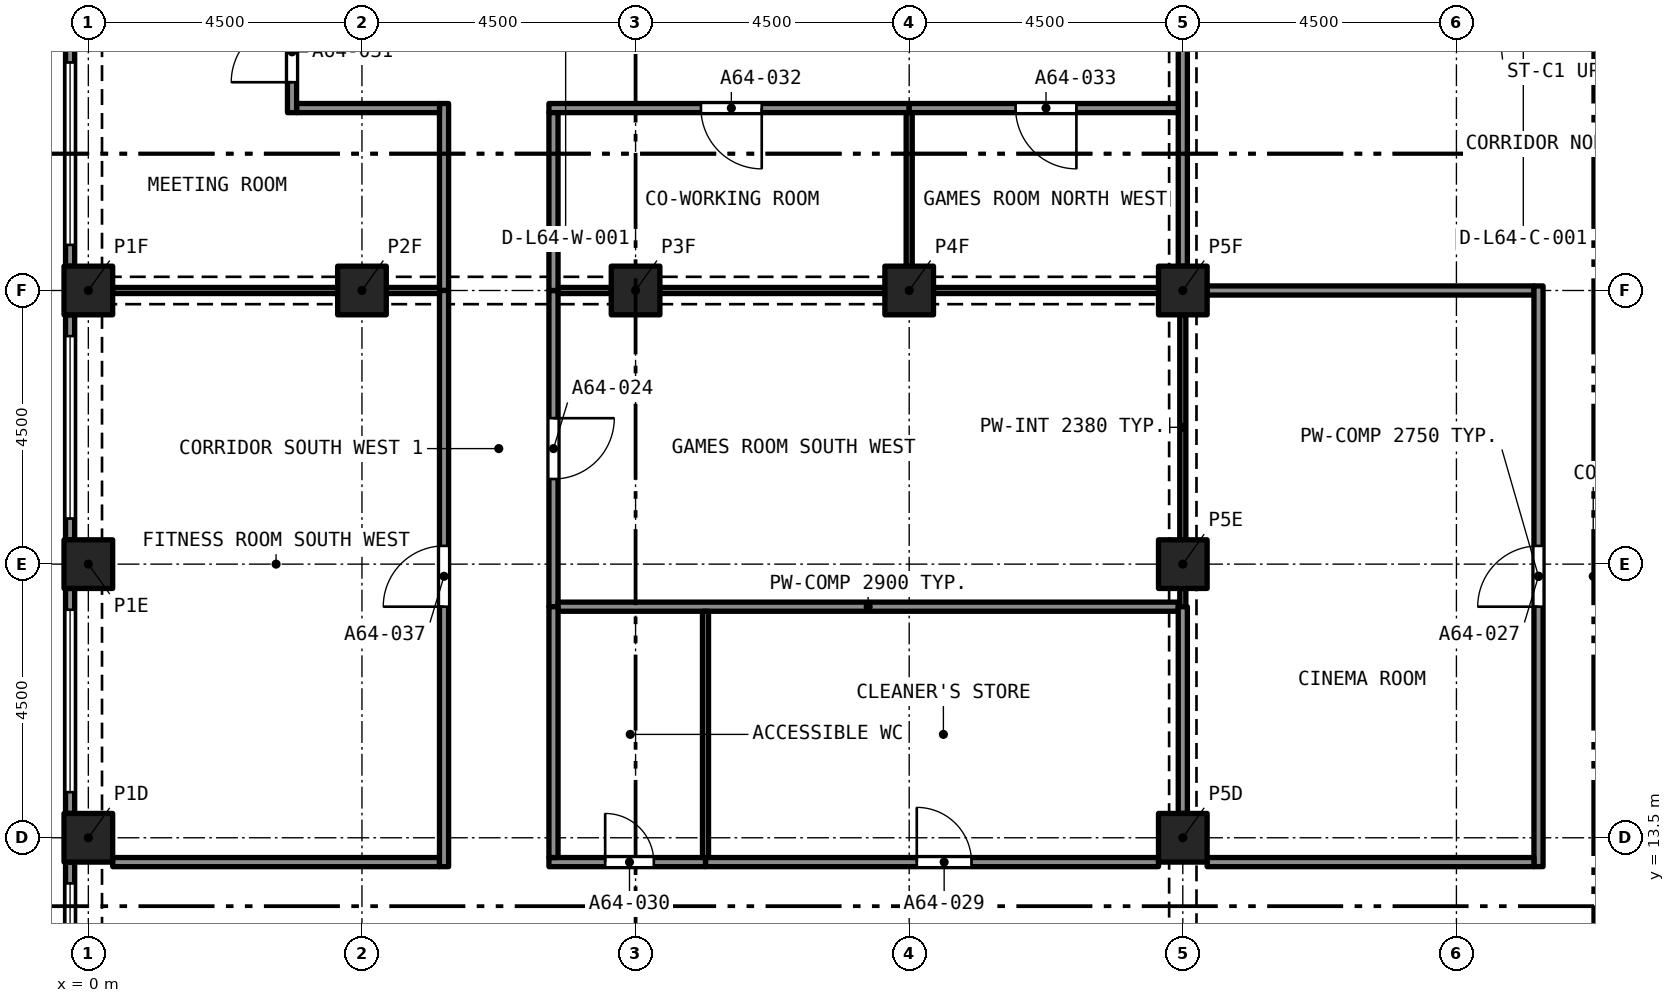
"""IFC4 building model, lengths in metres.
Left out: names, types, materials, properties, quantities, classifications, styles, units other than length and angle.
Written with IfcOpenShell. Run it as: python <this file> out.ifc"""

import sys

from ifc_helpers import new_model, si_unit, direction, frame, frame_2d, origin, origin_2d, place, context, subcontext, project, spatial, rectangle, extrude, element, fill, save


model = new_model("IFC4")
c1 = context("Model", 3, precision=1e-05, world=origin(), true_north=direction((0.0, 1.0)))
c2 = subcontext(c1, "Body", "Model", "MODEL_VIEW")
j1 = project(units=[si_unit("LENGTHUNIT", "METRE"), si_unit("PLANEANGLEUNIT", "RADIAN")], contexts=[c1])
p1 = place(None, origin())
s1 = spatial("IfcSite", under=j1, at=p1, CompositionType="ELEMENT")
p2 = place(p1, origin())
s2 = spatial("IfcBuilding", under=s1, at=p2, CompositionType="ELEMENT")
p3 = place(p2, frame((0.0, 0.0, 229.295)))
s3 = spatial("IfcBuildingStorey", under=s2, at=p3, CompositionType="ELEMENT", Elevation=229.295)
for number, where, z_axis, x_axis in (
    (1, (0.0, 13.5, 0.0), (0.0, 0.0, 1.0), (1.0, 0.0, 0.0)),
    (2, (18.0, 13.5, 0.0), (0.0, 0.0, 1.0), (1.0, 0.0, 0.0)),
    (3, (0.0, 18.0, 0.0), (0.0, 0.0, 1.0), (1.0, 0.0, 0.0)),
    (4, (18.0, 18.0, 0.0), (0.0, 0.0, 1.0), (1.0, 0.0, 0.0)),
    (5, (0.0, 22.5, 0.0), (0.0, 0.0, 1.0), (1.0, 0.0, 0.0)),
    (6, (4.5, 22.5, 0.0), (0.0, 0.0, 1.0), (1.0, 0.0, 0.0)),
    (7, (9.0, 22.5, 0.0), (0.0, 0.0, 1.0), (1.0, 0.0, 0.0)),
    (8, (13.5, 22.5, 0.0), (0.0, 0.0, 1.0), (1.0, 0.0, 0.0)),
    (9, (18.0, 22.5, 0.0), (0.0, 0.0, 1.0), (1.0, 0.0, 0.0)),
):
    element("IfcColumn", number, at=place(p3, frame(where, z_axis=z_axis, x_axis=x_axis)), inside=s3, PredefinedType="COLUMN", context=c2, shape_type="SweptSolid", body=[
        extrude(rectangle(XDim=0.8, YDim=0.8, at=origin_2d()), origin(), (0.0, 0.0, 1.0), 3.2),
    ])
p4 = place(p3, frame((-0.3, 22.9, 0.0), z_axis=(0.0, 0.0, 1.0), x_axis=(0.0, 1.0, 0.0)))
e10 = element("IfcWall", 10, at=p4, inside=s3, PredefinedType="SOLIDWALL", context=c2, shape_type="SweptSolid", body=[
    extrude(rectangle(XDim=3.7, YDim=0.15, at=frame_2d((1.85, 0.0))), origin(), (0.0, 0.0, 1.0), 3.2),
])
p5 = place(p4, frame((0.35, 0.0, 0.45)))
e11 = element("IfcOpeningElement", 11, at=p5, cuts=e10, PredefinedType="OPENING", context=c2, shape_type="SweptSolid", body=[
    extrude(rectangle(XDim=3.0, YDim=1.95, at=frame_2d((1.5, 0.975))), frame((0.0, 0.085, 0.0), z_axis=(0.0, -1.0, 0.0), x_axis=(1.0, 0.0, 0.0)), (0.0, 0.0, 1.0), 0.17),
])
p6 = place(p3, frame((-0.3, 18.4, 0.0), z_axis=(0.0, 0.0, 1.0), x_axis=(0.0, 1.0, 0.0)))
e12 = element("IfcWall", 12, at=p6, inside=s3, PredefinedType="SOLIDWALL", context=c2, shape_type="SweptSolid", body=[
    extrude(rectangle(XDim=3.7, YDim=0.15, at=frame_2d((1.85, 0.0))), origin(), (0.0, 0.0, 1.0), 3.2),
])
p7 = place(p6, frame((0.35, 0.0, 0.45)))
e13 = element("IfcOpeningElement", 13, at=p7, cuts=e12, PredefinedType="OPENING", context=c2, shape_type="SweptSolid", body=[
    extrude(rectangle(XDim=3.0, YDim=1.95, at=frame_2d((1.5, 0.975))), frame((0.0, 0.085, 0.0), z_axis=(0.0, -1.0, 0.0), x_axis=(1.0, 0.0, 0.0)), (0.0, 0.0, 1.0), 0.17),
])
p8 = place(p3, frame((-0.3, 13.9, 0.0), z_axis=(0.0, 0.0, 1.0), x_axis=(0.0, 1.0, 0.0)))
e14 = element("IfcWall", 14, at=p8, inside=s3, PredefinedType="SOLIDWALL", context=c2, shape_type="SweptSolid", body=[
    extrude(rectangle(XDim=3.7, YDim=0.15, at=frame_2d((1.85, 0.0))), origin(), (0.0, 0.0, 1.0), 3.2),
])
p9 = place(p8, frame((0.35, 0.0, 0.45)))
e15 = element("IfcOpeningElement", 15, at=p9, cuts=e14, PredefinedType="OPENING", context=c2, shape_type="SweptSolid", body=[
    extrude(rectangle(XDim=3.0, YDim=1.95, at=frame_2d((1.5, 0.975))), frame((0.0, 0.085, 0.0), z_axis=(0.0, -1.0, 0.0), x_axis=(1.0, 0.0, 0.0)), (0.0, 0.0, 1.0), 0.17),
])
p10 = place(p3, frame((-0.3, 9.4, 0.0), z_axis=(0.0, 0.0, 1.0), x_axis=(0.0, 1.0, 0.0)))
e16 = element("IfcWall", 16, at=p10, inside=s3, PredefinedType="SOLIDWALL", context=c2, shape_type="SweptSolid", body=[
    extrude(rectangle(XDim=3.7, YDim=0.15, at=frame_2d((1.85, 0.0))), origin(), (0.0, 0.0, 1.0), 3.2),
])
p11 = place(p10, frame((0.35, 0.0, 0.45)))
e17 = element("IfcOpeningElement", 17, at=p11, cuts=e16, PredefinedType="OPENING", context=c2, shape_type="SweptSolid", body=[
    extrude(rectangle(XDim=3.0, YDim=1.95, at=frame_2d((1.5, 0.975))), frame((0.0, 0.085, 0.0), z_axis=(0.0, -1.0, 0.0), x_axis=(1.0, 0.0, 0.0)), (0.0, 0.0, 1.0), 0.17),
])
p12 = place(p3, frame((18.0, 18.4, 0.0), z_axis=(0.0, 0.0, 1.0), x_axis=(0.0, 1.0, 0.0)))
e18 = element("IfcWall", 18, at=p12, inside=s3, PredefinedType="PARTITIONING", context=c2, shape_type="SweptSolid", body=[
    extrude(rectangle(XDim=3.7, YDim=0.1, at=frame_2d((1.85, 0.0))), origin(), (0.0, 0.0, 1.0), 2.38),
])
p13 = place(p3, frame((18.0, 17.3, 0.0), z_axis=(0.0, 0.0, 1.0), x_axis=(0.0, 1.0, 0.0)))
e19 = element("IfcWall", 19, at=p13, inside=s3, PredefinedType="PARTITIONING", context=c2, shape_type="SweptSolid", body=[
    extrude(rectangle(XDim=0.3, YDim=0.1, at=frame_2d((0.15, 0.0))), origin(), (0.0, 0.0, 1.0), 2.75),
])
p14 = place(p3, frame((7.65, 22.5, 0.0), z_axis=(0.0, 0.0, 1.0), x_axis=(0.0, -1.0, 0.0)))
e20 = element("IfcWall", 20, at=p14, inside=s3, PredefinedType="PARTITIONING", context=c2, shape_type="SweptSolid", body=[
    extrude(rectangle(XDim=5.2, YDim=0.15, at=frame_2d((2.6, 0.0))), origin(), (0.0, 0.0, 1.0), 2.9),
])
p15 = place(p14, frame((2.1, 0.0, 0.0)))
e21 = element("IfcOpeningElement", 21, at=p15, cuts=e20, PredefinedType="OPENING", context=c2, shape_type="SweptSolid", body=[
    extrude(rectangle(XDim=1.0, YDim=2.1, at=frame_2d((0.5, 1.05))), frame((0.0, 0.085, 0.0), z_axis=(0.0, -1.0, 0.0), x_axis=(1.0, 0.0, 0.0)), (0.0, 0.0, 1.0), 0.17),
])
p16 = place(p3, frame((7.725, 22.5, 0.0), z_axis=(0.0, 0.0, 1.0), x_axis=(1.0, 0.0, 0.0)))
e22 = element("IfcWall", 22, at=p16, inside=s3, PredefinedType="PARTITIONING", context=c2, shape_type="SweptSolid", body=[
    extrude(rectangle(XDim=0.875, YDim=0.1, at=frame_2d((0.438, 0.0))), origin(), (0.0, 0.0, 1.0), 2.38),
])
for number, where, z_axis, x_axis in (
    (23, (9.4, 22.5, 0.0), (0.0, 0.0, 1.0), (1.0, 0.0, 0.0)),
    (24, (13.9, 22.5, 0.0), (0.0, 0.0, 1.0), (1.0, 0.0, 0.0)),
):
    element("IfcWall", number, at=place(p3, frame(where, z_axis=z_axis, x_axis=x_axis)), inside=s3, PredefinedType="PARTITIONING", context=c2, shape_type="SweptSolid", body=[
        extrude(rectangle(XDim=3.7, YDim=0.1, at=frame_2d((1.85, 0.0))), origin(), (0.0, 0.0, 1.0), 2.38),
    ])
p17 = place(p3, frame((7.725, 17.3, 0.0), z_axis=(0.0, 0.0, 1.0), x_axis=(1.0, 0.0, 0.0)))
e25 = element("IfcWall", 25, at=p17, inside=s3, PredefinedType="PARTITIONING", context=c2, shape_type="SweptSolid", body=[
    extrude(rectangle(XDim=10.2, YDim=0.15, at=frame_2d((5.1, 0.0))), origin(), (0.0, 0.0, 1.0), 2.9),
])
p18 = place(p3, frame((18.4, 22.5, 0.0), z_axis=(0.0, 0.0, 1.0), x_axis=(1.0, 0.0, 0.0)))
e26 = element("IfcWall", 26, at=p18, inside=s3, PredefinedType="PARTITIONING", context=c2, shape_type="SweptSolid", body=[
    extrude(rectangle(XDim=5.375, YDim=0.15, at=frame_2d((2.688, 0.0))), origin(), (0.0, 0.0, 1.0), 2.75),
])
p19 = place(p3, frame((18.0, 22.9, 0.0), z_axis=(0.0, 0.0, 1.0), x_axis=(0.0, 1.0, 0.0)))
e27 = element("IfcWall", 27, at=p19, inside=s3, PredefinedType="PARTITIONING", context=c2, shape_type="SweptSolid", body=[
    extrude(rectangle(XDim=3.7, YDim=0.15, at=frame_2d((1.85, 0.0))), origin(), (0.0, 0.0, 1.0), 2.38),
])
p20 = place(p3, frame((23.85, 13.025, 0.0), z_axis=(0.0, 0.0, 1.0), x_axis=(0.0, 1.0, 0.0)))
e28 = element("IfcWall", 28, at=p20, inside=s3, PredefinedType="PARTITIONING", context=c2, shape_type="SweptSolid", body=[
    extrude(rectangle(XDim=9.55, YDim=0.15, at=frame_2d((4.775, 0.0))), origin(), (0.0, 0.0, 1.0), 2.75),
])
p21 = place(p20, frame((4.275, 0.0, 0.0)))
e29 = element("IfcOpeningElement", 29, at=p21, cuts=e28, PredefinedType="OPENING", context=c2, shape_type="SweptSolid", body=[
    extrude(rectangle(XDim=1.0, YDim=2.1, at=frame_2d((0.5, 1.05))), frame((0.0, 0.085, 0.0), z_axis=(0.0, -1.0, 0.0), x_axis=(1.0, 0.0, 0.0)), (0.0, 0.0, 1.0), 0.17),
])
p22 = place(p3, frame((18.4, 13.1, 0.0), z_axis=(0.0, 0.0, 1.0), x_axis=(1.0, 0.0, 0.0)))
e30 = element("IfcWall", 30, at=p22, inside=s3, PredefinedType="PARTITIONING", context=c2, shape_type="SweptSolid", body=[
    extrude(rectangle(XDim=5.375, YDim=0.15, at=frame_2d((2.688, 0.0))), origin(), (0.0, 0.0, 1.0), 2.75),
])
p23 = place(p3, frame((10.15, 13.1, 0.0), z_axis=(0.0, 0.0, 1.0), x_axis=(1.0, 0.0, 0.0)))
e31 = element("IfcWall", 31, at=p23, inside=s3, PredefinedType="PARTITIONING", context=c2, shape_type="SweptSolid", body=[
    extrude(rectangle(XDim=7.45, YDim=0.15, at=frame_2d((3.725, 0.0))), origin(), (0.0, 0.0, 1.0), 2.9),
])
p24 = place(p23, frame((3.475, 0.0, 0.0)))
e32 = element("IfcOpeningElement", 32, at=p24, cuts=e31, PredefinedType="OPENING", context=c2, shape_type="SweptSolid", body=[
    extrude(rectangle(XDim=0.9, YDim=2.1, at=frame_2d((0.45, 1.05))), frame((0.0, 0.085, 0.0), z_axis=(0.0, -1.0, 0.0), x_axis=(1.0, 0.0, 0.0)), (0.0, 0.0, 1.0), 0.17),
])
p25 = place(p3, frame((7.575, 13.1, 0.0), z_axis=(0.0, 0.0, 1.0), x_axis=(1.0, 0.0, 0.0)))
e33 = element("IfcWall", 33, at=p25, inside=s3, PredefinedType="PARTITIONING", context=c2, shape_type="SweptSolid", body=[
    extrude(rectangle(XDim=2.575, YDim=0.15, at=frame_2d((1.288, 0.0))), origin(), (0.0, 0.0, 1.0), 2.9),
])
p26 = place(p25, frame((0.925, 0.0, 0.0)))
e34 = element("IfcOpeningElement", 34, at=p26, cuts=e33, PredefinedType="OPENING", context=c2, shape_type="SweptSolid", body=[
    extrude(rectangle(XDim=0.8, YDim=2.1, at=frame_2d((0.4, 1.05))), frame((0.0, 0.085, 0.0), z_axis=(0.0, -1.0, 0.0), x_axis=(1.0, 0.0, 0.0)), (0.0, 0.0, 1.0), 0.17),
])
p27 = place(p3, frame((0.4, 13.1, 0.0), z_axis=(0.0, 0.0, 1.0), x_axis=(1.0, 0.0, 0.0)))
e35 = element("IfcWall", 35, at=p27, inside=s3, PredefinedType="PARTITIONING", context=c2, shape_type="SweptSolid", body=[
    extrude(rectangle(XDim=5.375, YDim=0.15, at=frame_2d((2.688, 0.0))), origin(), (0.0, 0.0, 1.0), 2.9),
])
p28 = place(p3, frame((18.0, 13.9, 0.0), z_axis=(0.0, 0.0, 1.0), x_axis=(0.0, 1.0, 0.0)))
e36 = element("IfcWall", 36, at=p28, inside=s3, PredefinedType="PARTITIONING", context=c2, shape_type="SweptSolid", body=[
    extrude(rectangle(XDim=3.4, YDim=0.15, at=frame_2d((1.7, 0.0))), origin(), (0.0, 0.0, 1.0), 2.38),
])
p29 = place(p3, frame((5.85, 22.5, 0.0), z_axis=(0.0, 0.0, 1.0), x_axis=(0.0, 1.0, 0.0)))
e37 = element("IfcWall", 37, at=p29, inside=s3, PredefinedType="PARTITIONING", context=c2, shape_type="SweptSolid", body=[
    extrude(rectangle(XDim=3.075, YDim=0.15, at=frame_2d((1.538, 0.0))), origin(), (0.0, 0.0, 1.0), 2.9),
])
p30 = place(p3, frame((3.425, 25.5, 0.0), z_axis=(0.0, 0.0, 1.0), x_axis=(1.0, 0.0, 0.0)))
e38 = element("IfcWall", 38, at=p30, inside=s3, PredefinedType="PARTITIONING", context=c2, shape_type="SweptSolid", body=[
    extrude(rectangle(XDim=2.35, YDim=0.15, at=frame_2d((1.175, 0.0))), origin(), (0.0, 0.0, 1.0), 2.9),
])
p31 = place(p3, frame((3.35, 25.425, 0.0), z_axis=(0.0, 0.0, 1.0), x_axis=(0.0, 1.0, 0.0)))
e39 = element("IfcWall", 39, at=p31, inside=s3, PredefinedType="PARTITIONING", context=c2, shape_type="SweptSolid", body=[
    extrude(rectangle(XDim=1.925, YDim=0.15, at=frame_2d((0.962, 0.0))), origin(), (0.0, 0.0, 1.0), 2.9),
])
p32 = place(p31, frame((0.5, 0.0, 0.0)))
e40 = element("IfcOpeningElement", 40, at=p32, cuts=e39, PredefinedType="OPENING", context=c2, shape_type="SweptSolid", body=[
    extrude(rectangle(XDim=1.0, YDim=2.1, at=frame_2d((0.5, 1.05))), frame((0.0, 0.085, 0.0), z_axis=(0.0, -1.0, 0.0), x_axis=(1.0, 0.0, 0.0)), (0.0, 0.0, 1.0), 0.17),
])
p33 = place(p3, frame((13.5, 25.5, 0.0), z_axis=(0.0, 0.0, 1.0), x_axis=(-1.0, 0.0, 0.0)))
e41 = element("IfcWall", 41, at=p33, inside=s3, PredefinedType="PARTITIONING", context=c2, shape_type="SweptSolid", body=[
    extrude(rectangle(XDim=5.925, YDim=0.15, at=frame_2d((2.962, 0.0))), origin(), (0.0, 0.0, 1.0), 2.9),
])
p34 = place(p33, frame((2.425, 0.0, 0.0)))
e42 = element("IfcOpeningElement", 42, at=p34, cuts=e41, PredefinedType="OPENING", context=c2, shape_type="SweptSolid", body=[
    extrude(rectangle(XDim=1.0, YDim=2.1, at=frame_2d((0.5, 1.05))), frame((0.0, 0.085, 0.0), z_axis=(0.0, -1.0, 0.0), x_axis=(1.0, 0.0, 0.0)), (0.0, 0.0, 1.0), 0.17),
])
p35 = place(p3, frame((7.65, 22.5, 0.0), z_axis=(0.0, 0.0, 1.0), x_axis=(0.0, 1.0, 0.0)))
e43 = element("IfcWall", 43, at=p35, inside=s3, PredefinedType="PARTITIONING", context=c2, shape_type="SweptSolid", body=[
    extrude(rectangle(XDim=2.925, YDim=0.15, at=frame_2d((1.462, 0.0))), origin(), (0.0, 0.0, 1.0), 2.9),
])
p36 = place(p3, frame((17.925, 25.5, 0.0), z_axis=(0.0, 0.0, 1.0), x_axis=(-1.0, 0.0, 0.0)))
e44 = element("IfcWall", 44, at=p36, inside=s3, PredefinedType="PARTITIONING", context=c2, shape_type="SweptSolid", body=[
    extrude(rectangle(XDim=4.425, YDim=0.15, at=frame_2d((2.212, 0.0))), origin(), (0.0, 0.0, 1.0), 2.9),
])
p37 = place(p36, frame((1.675, 0.0, 0.0)))
e45 = element("IfcOpeningElement", 45, at=p37, cuts=e44, PredefinedType="OPENING", context=c2, shape_type="SweptSolid", body=[
    extrude(rectangle(XDim=1.0, YDim=2.1, at=frame_2d((0.5, 1.05))), frame((0.0, 0.085, 0.0), z_axis=(0.0, -1.0, 0.0), x_axis=(1.0, 0.0, 0.0)), (0.0, 0.0, 1.0), 0.17),
])
p38 = place(p3, frame((7.65, 13.175, 0.0), z_axis=(0.0, 0.0, 1.0), x_axis=(0.0, 1.0, 0.0)))
e46 = element("IfcWall", 46, at=p38, inside=s3, PredefinedType="PARTITIONING", context=c2, shape_type="SweptSolid", body=[
    extrude(rectangle(XDim=4.125, YDim=0.15, at=frame_2d((2.062, 0.0))), origin(), (0.0, 0.0, 1.0), 2.9),
])
p39 = place(p3, frame((5.85, 13.025, 0.0), z_axis=(0.0, 0.0, 1.0), x_axis=(0.0, 1.0, 0.0)))
e47 = element("IfcWall", 47, at=p39, inside=s3, PredefinedType="PARTITIONING", context=c2, shape_type="SweptSolid", body=[
    extrude(rectangle(XDim=9.475, YDim=0.15, at=frame_2d((4.738, 0.0))), origin(), (0.0, 0.0, 1.0), 2.9),
])
p40 = place(p39, frame((4.275, 0.0, 0.0)))
e48 = element("IfcOpeningElement", 48, at=p40, cuts=e47, PredefinedType="OPENING", context=c2, shape_type="SweptSolid", body=[
    extrude(rectangle(XDim=1.0, YDim=2.1, at=frame_2d((0.5, 1.05))), frame((0.0, 0.085, 0.0), z_axis=(0.0, -1.0, 0.0), x_axis=(1.0, 0.0, 0.0)), (0.0, 0.0, 1.0), 0.17),
])
p41 = place(p3, frame((4.9, 22.5, 0.0), z_axis=(0.0, 0.0, 1.0), x_axis=(1.0, 0.0, 0.0)))
e49 = element("IfcWall", 49, at=p41, inside=s3, PredefinedType="PARTITIONING", context=c2, shape_type="SweptSolid", body=[
    extrude(rectangle(XDim=0.875, YDim=0.1, at=frame_2d((0.438, 0.0))), origin(), (0.0, 0.0, 1.0), 2.38),
])
p42 = place(p3, frame((0.4, 22.5, 0.0), z_axis=(0.0, 0.0, 1.0), x_axis=(1.0, 0.0, 0.0)))
e50 = element("IfcWall", 50, at=p42, inside=s3, PredefinedType="PARTITIONING", context=c2, shape_type="SweptSolid", body=[
    extrude(rectangle(XDim=3.7, YDim=0.1, at=frame_2d((1.85, 0.0))), origin(), (0.0, 0.0, 1.0), 2.38),
])
p43 = place(p3, frame((13.5, 22.9, 0.0), z_axis=(0.0, 0.0, 1.0), x_axis=(0.0, 1.0, 0.0)))
e51 = element("IfcWall", 51, at=p43, inside=s3, PredefinedType="PARTITIONING", context=c2, shape_type="SweptSolid", body=[
    extrude(rectangle(XDim=2.525, YDim=0.1, at=frame_2d((1.263, 0.0))), origin(), (0.0, 0.0, 1.0), 2.9),
])
p44 = place(p3, frame((10.15, 13.175, 0.0), z_axis=(0.0, 0.0, 1.0), x_axis=(0.0, 1.0, 0.0)))
e52 = element("IfcWall", 52, at=p44, inside=s3, PredefinedType="PARTITIONING", context=c2, shape_type="SweptSolid", body=[
    extrude(rectangle(XDim=4.05, YDim=0.1, at=frame_2d((2.025, 0.0))), origin(), (0.0, 0.0, 1.0), 2.9),
])
p45 = place(p5, origin())
e53 = element("IfcWindow", 53, at=p45, inside=s3, PartitioningType="SINGLE_PANEL", PredefinedType="WINDOW", context=c2, shape_type="SweptSolid", body=[
    extrude(rectangle(XDim=3.0, YDim=1.95, at=frame_2d((1.5, 0.975))), frame((0.0, 0.03, 0.0), z_axis=(0.0, -1.0, 0.0), x_axis=(1.0, 0.0, 0.0)), (0.0, 0.0, 1.0), 0.06),
])
fill(e11, e53)
p46 = place(p7, origin())
e54 = element("IfcWindow", 54, at=p46, inside=s3, PartitioningType="SINGLE_PANEL", PredefinedType="WINDOW", context=c2, shape_type="SweptSolid", body=[
    extrude(rectangle(XDim=3.0, YDim=1.95, at=frame_2d((1.5, 0.975))), frame((0.0, 0.03, 0.0), z_axis=(0.0, -1.0, 0.0), x_axis=(1.0, 0.0, 0.0)), (0.0, 0.0, 1.0), 0.06),
])
fill(e13, e54)
p47 = place(p9, origin())
e55 = element("IfcWindow", 55, at=p47, inside=s3, PartitioningType="SINGLE_PANEL", PredefinedType="WINDOW", context=c2, shape_type="SweptSolid", body=[
    extrude(rectangle(XDim=3.0, YDim=1.95, at=frame_2d((1.5, 0.975))), frame((0.0, 0.03, 0.0), z_axis=(0.0, -1.0, 0.0), x_axis=(1.0, 0.0, 0.0)), (0.0, 0.0, 1.0), 0.06),
])
fill(e15, e55)
p48 = place(p11, origin())
e56 = element("IfcWindow", 56, at=p48, inside=s3, PartitioningType="SINGLE_PANEL", PredefinedType="WINDOW", context=c2, shape_type="SweptSolid", body=[
    extrude(rectangle(XDim=3.0, YDim=1.95, at=frame_2d((1.5, 0.975))), frame((0.0, 0.03, 0.0), z_axis=(0.0, -1.0, 0.0), x_axis=(1.0, 0.0, 0.0)), (0.0, 0.0, 1.0), 0.06),
])
fill(e17, e56)
p49 = place(p15, origin())
e57 = element("IfcDoor", 57, at=p49, inside=s3, OperationType="SINGLE_SWING_RIGHT", PredefinedType="DOOR", context=c2, shape_type="SweptSolid", body=[
    extrude(rectangle(XDim=1.0, YDim=2.1, at=frame_2d((0.5, 1.05))), frame((0.0, 0.025, 0.0), z_axis=(0.0, -1.0, 0.0), x_axis=(1.0, 0.0, 0.0)), (0.0, 0.0, 1.0), 0.05),
])
fill(e21, e57)
p50 = place(p21, origin())
e58 = element("IfcDoor", 58, at=p50, inside=s3, OperationType="SINGLE_SWING_RIGHT", PredefinedType="DOOR", context=c2, shape_type="SweptSolid", body=[
    extrude(rectangle(XDim=1.0, YDim=2.1, at=frame_2d((0.5, 1.05))), frame((0.0, 0.025, 0.0), z_axis=(0.0, -1.0, 0.0), x_axis=(1.0, 0.0, 0.0)), (0.0, 0.0, 1.0), 0.05),
])
fill(e29, e58)
p51 = place(p24, origin())
e59 = element("IfcDoor", 59, at=p51, inside=s3, OperationType="SINGLE_SWING_RIGHT", PredefinedType="DOOR", context=c2, shape_type="SweptSolid", body=[
    extrude(rectangle(XDim=0.9, YDim=2.1, at=frame_2d((0.45, 1.05))), frame((0.0, 0.025, 0.0), z_axis=(0.0, -1.0, 0.0), x_axis=(1.0, 0.0, 0.0)), (0.0, 0.0, 1.0), 0.05),
])
fill(e32, e59)
p52 = place(p26, origin())
e60 = element("IfcDoor", 60, at=p52, inside=s3, OperationType="SINGLE_SWING_RIGHT", PredefinedType="DOOR", context=c2, shape_type="SweptSolid", body=[
    extrude(rectangle(XDim=0.8, YDim=2.1, at=frame_2d((0.4, 1.05))), frame((0.0, 0.025, 0.0), z_axis=(0.0, -1.0, 0.0), x_axis=(1.0, 0.0, 0.0)), (0.0, 0.0, 1.0), 0.05),
])
fill(e34, e60)
p53 = place(p32, origin())
e61 = element("IfcDoor", 61, at=p53, inside=s3, OperationType="SINGLE_SWING_RIGHT", PredefinedType="DOOR", context=c2, shape_type="SweptSolid", body=[
    extrude(rectangle(XDim=1.0, YDim=2.1, at=frame_2d((0.5, 1.05))), frame((0.0, 0.025, 0.0), z_axis=(0.0, -1.0, 0.0), x_axis=(1.0, 0.0, 0.0)), (0.0, 0.0, 1.0), 0.05),
])
fill(e40, e61)
p54 = place(p34, origin())
e62 = element("IfcDoor", 62, at=p54, inside=s3, OperationType="SINGLE_SWING_LEFT", PredefinedType="DOOR", context=c2, shape_type="SweptSolid", body=[
    extrude(rectangle(XDim=1.0, YDim=2.1, at=frame_2d((0.5, 1.05))), frame((0.0, 0.025, 0.0), z_axis=(0.0, -1.0, 0.0), x_axis=(1.0, 0.0, 0.0)), (0.0, 0.0, 1.0), 0.05),
])
fill(e42, e62)
p55 = place(p37, origin())
e63 = element("IfcDoor", 63, at=p55, inside=s3, OperationType="SINGLE_SWING_LEFT", PredefinedType="DOOR", context=c2, shape_type="SweptSolid", body=[
    extrude(rectangle(XDim=1.0, YDim=2.1, at=frame_2d((0.5, 1.05))), frame((0.0, 0.025, 0.0), z_axis=(0.0, -1.0, 0.0), x_axis=(1.0, 0.0, 0.0)), (0.0, 0.0, 1.0), 0.05),
])
fill(e45, e63)
p56 = place(p40, origin())
e64 = element("IfcDoor", 64, at=p56, inside=s3, OperationType="SINGLE_SWING_RIGHT", PredefinedType="DOOR", context=c2, shape_type="SweptSolid", body=[
    extrude(rectangle(XDim=1.0, YDim=2.1, at=frame_2d((0.5, 1.05))), frame((0.0, 0.025, 0.0), z_axis=(0.0, -1.0, 0.0), x_axis=(1.0, 0.0, 0.0)), (0.0, 0.0, 1.0), 0.05),
])
fill(e48, e64)
save(model, sys.argv[1])
